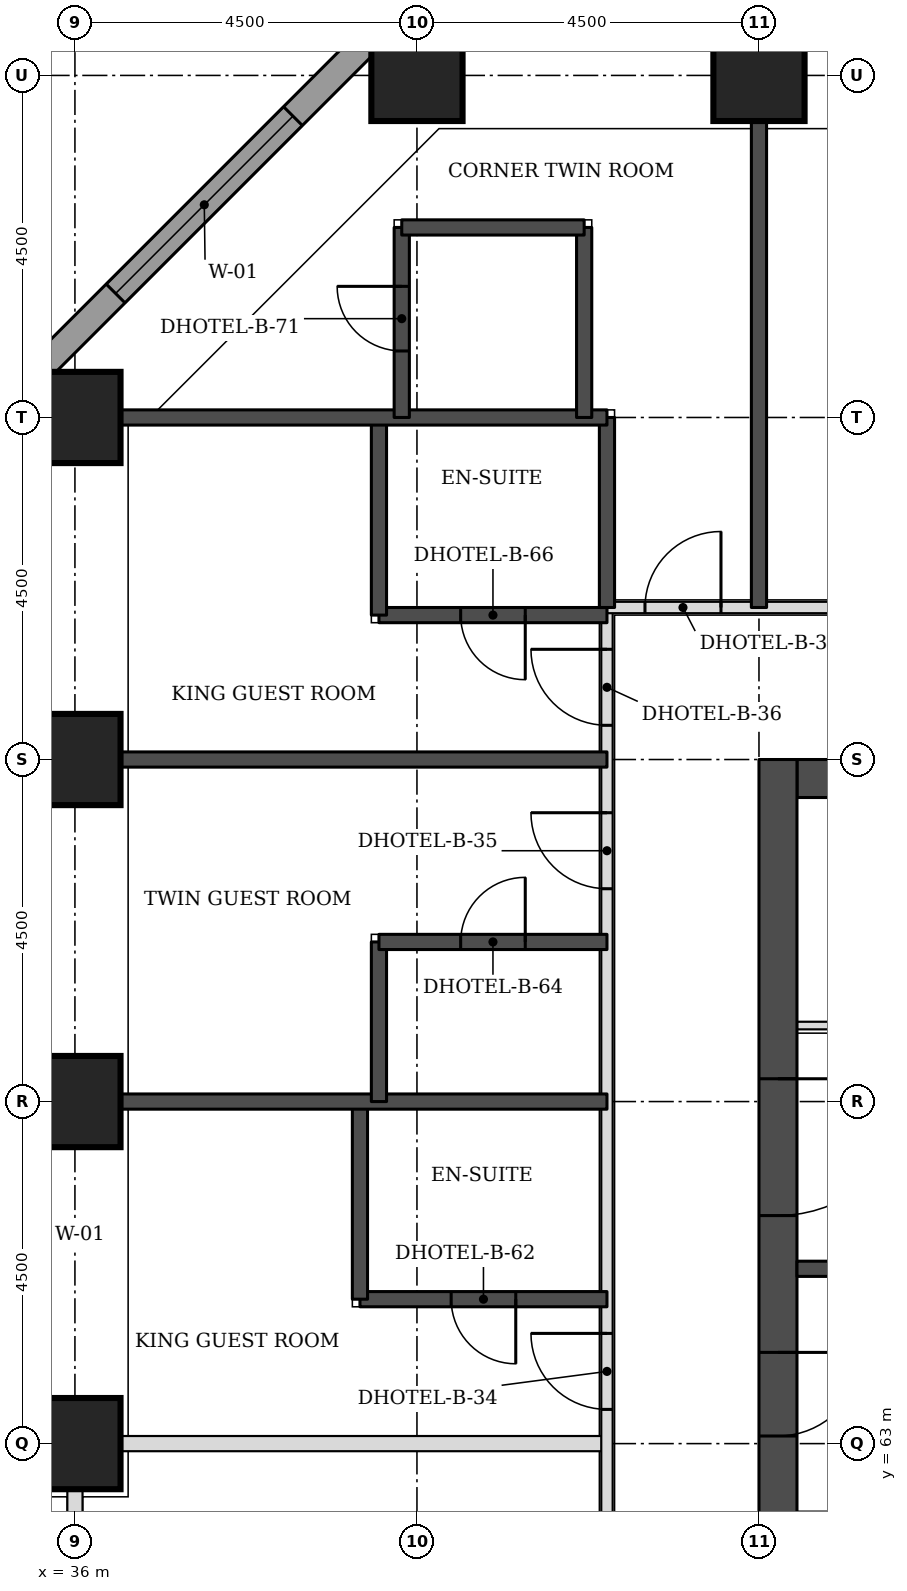
"""IFC4 building model, lengths in metres.
Left out: names, types, materials, properties, quantities, classifications, styles, units other than length and angle.
Written with IfcOpenShell. Run it as: python <this file> out.ifc"""

import sys

from ifc_helpers import new_model, si_unit, direction, frame, frame_2d, origin, origin_2d, place, context, subcontext, project, spatial, rectangle, extrude, element, fill, save


model = new_model("IFC4")
c1 = context("Model", 3, precision=1e-05, world=origin(), true_north=direction((0.0, 1.0)))
c2 = subcontext(c1, "Body", "Model", "MODEL_VIEW")
j1 = project(units=[si_unit("LENGTHUNIT", "METRE"), si_unit("PLANEANGLEUNIT", "RADIAN")], contexts=[c1])
p1 = place(None, origin())
s1 = spatial("IfcSite", under=j1, at=p1, CompositionType="ELEMENT")
p2 = place(p1, origin())
s2 = spatial("IfcBuilding", under=s1, at=p2, CompositionType="ELEMENT")
p3 = place(p2, frame((0.0, 0.0, 29.7)))
s3 = spatial("IfcBuildingStorey", under=s2, at=p3, CompositionType="ELEMENT", Elevation=29.7)
for number, where, z_axis, x_axis in (
    (1, (36.0, 63.0, 0.0), (0.0, 0.0, 1.0), (1.0, 0.0, 0.0)),
    (2, (36.0, 67.5, 0.0), (0.0, 0.0, 1.0), (1.0, 0.0, 0.0)),
    (3, (36.0, 72.0, 0.0), (0.0, 0.0, 1.0), (1.0, 0.0, 0.0)),
    (4, (36.0, 76.5, 0.0), (0.0, 0.0, 1.0), (1.0, 0.0, 0.0)),
    (5, (40.5, 81.0, 0.0), (0.0, 0.0, 1.0), (1.0, 0.0, 0.0)),
    (6, (45.0, 81.0, 0.0), (0.0, 0.0, 1.0), (1.0, 0.0, 0.0)),
):
    element("IfcColumn", number, at=place(p3, frame(where, z_axis=z_axis, x_axis=x_axis)), inside=s3, PredefinedType="COLUMN", context=c2, shape_type="SweptSolid", body=[
        extrude(rectangle(XDim=1.2, YDim=1.2, at=origin_2d()), origin(), (0.0, 0.0, 1.0), 3.3),
    ])
p4 = place(p3, frame((45.5, 71.75, 0.0), z_axis=(0.0, 0.0, 1.0), x_axis=(1.0, 0.0, 0.0)))
e7 = element("IfcWall", 7, at=p4, inside=s3, PredefinedType="SHEAR", context=c2, shape_type="SweptSolid", body=[
    extrude(rectangle(XDim=21.5, YDim=0.5, at=frame_2d((10.75, 0.0))), origin(), (0.0, 0.0, 1.0), 3.3),
])
p5 = place(p3, frame((45.25, 49.5, 0.0), z_axis=(0.0, 0.0, 1.0), x_axis=(0.0, 1.0, 0.0)))
e8 = element("IfcWall", 8, at=p5, inside=s3, PredefinedType="SHEAR", context=c2, shape_type="SweptSolid", body=[
    extrude(rectangle(XDim=22.5, YDim=0.5, at=frame_2d((11.25, 0.0))), origin(), (0.0, 0.0, 1.0), 3.3),
])
p6 = place(p5, frame((4.2, 0.0, 0.0)))
e9 = element("IfcOpeningElement", 9, at=p6, cuts=e8, PredefinedType="OPENING", context=c2, shape_type="SweptSolid", body=[
    extrude(rectangle(XDim=1.8, YDim=2.1, at=frame_2d((0.9, 1.05))), frame((0.0, 0.26, 0.0), z_axis=(0.0, -1.0, 0.0), x_axis=(1.0, 0.0, 0.0)), (0.0, 0.0, 1.0), 0.52),
])
p7 = place(p5, frame((6.9, 0.0, 0.0)))
e10 = element("IfcOpeningElement", 10, at=p7, cuts=e8, PredefinedType="OPENING", context=c2, shape_type="SweptSolid", body=[
    extrude(rectangle(XDim=1.1, YDim=2.1, at=frame_2d((0.55, 1.05))), frame((0.0, 0.26, 0.0), z_axis=(0.0, -1.0, 0.0), x_axis=(1.0, 0.0, 0.0)), (0.0, 0.0, 1.0), 0.52),
])
p8 = place(p5, frame((13.6, 0.0, 0.0)))
e11 = element("IfcOpeningElement", 11, at=p8, cuts=e8, PredefinedType="OPENING", context=c2, shape_type="SweptSolid", body=[
    extrude(rectangle(XDim=1.1, YDim=2.1, at=frame_2d((0.55, 1.05))), frame((0.0, 0.26, 0.0), z_axis=(0.0, -1.0, 0.0), x_axis=(1.0, 0.0, 0.0)), (0.0, 0.0, 1.0), 0.52),
])
p9 = place(p5, frame((16.5, 0.0, 0.0)))
e12 = element("IfcOpeningElement", 12, at=p9, cuts=e8, PredefinedType="OPENING", context=c2, shape_type="SweptSolid", body=[
    extrude(rectangle(XDim=1.8, YDim=2.1, at=frame_2d((0.9, 1.05))), frame((0.0, 0.26, 0.0), z_axis=(0.0, -1.0, 0.0), x_axis=(1.0, 0.0, 0.0)), (0.0, 0.0, 1.0), 0.52),
])
p10 = place(p3, frame((40.23, 81.826, 0.0), z_axis=(0.0, 0.0, 1.0), x_axis=(-0.707106781187, -0.707106781187, 0.0)))
e13 = element("IfcWall", 13, at=p10, inside=s3, PredefinedType="STANDARD", context=c2, shape_type="SweptSolid", body=[
    extrude(rectangle(XDim=7.151, YDim=0.35, at=frame_2d((3.576, 0.0))), origin(), (0.0, 0.0, 1.0), 3.055),
])
p11 = place(p10, frame((1.926, 0.0, 0.8)))
e14 = element("IfcOpeningElement", 14, at=p11, cuts=e13, PredefinedType="OPENING", context=c2, shape_type="SweptSolid", body=[
    extrude(rectangle(XDim=3.3, YDim=1.5, at=frame_2d((1.65, 0.75))), frame((0.0, 0.185, 0.0), z_axis=(0.0, -1.0, 0.0), x_axis=(1.0, 0.0, 0.0)), (0.0, 0.0, 1.0), 0.37),
])
p12 = place(p3, frame((36.0, 56.0, 0.0), z_axis=(0.0, 0.0, 1.0), x_axis=(0.0, 1.0, 0.0)))
e15 = element("IfcWall", 15, at=p12, inside=s3, PredefinedType="PARTITIONING", context=c2, shape_type="SweptSolid", body=[
    extrude(rectangle(XDim=6.4, YDim=0.2, at=frame_2d((3.2, 0.0))), origin(), (0.0, 0.0, 1.0), 2.33),
])
p13 = place(p3, frame((36.6, 63.0, 0.0), z_axis=(0.0, 0.0, 1.0), x_axis=(1.0, 0.0, 0.0)))
e16 = element("IfcWall", 16, at=p13, inside=s3, PredefinedType="PARTITIONING", context=c2, shape_type="SweptSolid", body=[
    extrude(rectangle(XDim=6.4, YDim=0.2, at=frame_2d((3.2, 0.0))), origin(), (0.0, 0.0, 1.0), 3.08),
])
p14 = place(p3, frame((43.0, 56.0, 0.0), z_axis=(0.0, 0.0, 1.0), x_axis=(0.0, 1.0, 0.0)))
e17 = element("IfcWall", 17, at=p14, inside=s3, PredefinedType="PARTITIONING", context=c2, shape_type="SweptSolid", body=[
    extrude(rectangle(XDim=18.0, YDim=0.15, at=frame_2d((9.0, 0.0))), origin(), (0.0, 0.0, 1.0), 3.08),
])
p15 = place(p14, frame((7.45, 0.0, 0.0)))
e18 = element("IfcOpeningElement", 18, at=p15, cuts=e17, PredefinedType="OPENING", context=c2, shape_type="SweptSolid", body=[
    extrude(rectangle(XDim=1.0, YDim=2.1, at=frame_2d((0.5, 1.05))), frame((0.0, 0.085, 0.0), z_axis=(0.0, -1.0, 0.0), x_axis=(1.0, 0.0, 0.0)), (0.0, 0.0, 1.0), 0.17),
])
p16 = place(p14, frame((14.3, 0.0, 0.0)))
e19 = element("IfcOpeningElement", 19, at=p16, cuts=e17, PredefinedType="OPENING", context=c2, shape_type="SweptSolid", body=[
    extrude(rectangle(XDim=1.0, YDim=2.1, at=frame_2d((0.5, 1.05))), frame((0.0, 0.085, 0.0), z_axis=(0.0, -1.0, 0.0), x_axis=(1.0, 0.0, 0.0)), (0.0, 0.0, 1.0), 0.17),
])
p17 = place(p14, frame((16.45, 0.0, 0.0)))
e20 = element("IfcOpeningElement", 20, at=p17, cuts=e17, PredefinedType="OPENING", context=c2, shape_type="SweptSolid", body=[
    extrude(rectangle(XDim=1.0, YDim=2.1, at=frame_2d((0.5, 1.05))), frame((0.0, 0.085, 0.0), z_axis=(0.0, -1.0, 0.0), x_axis=(1.0, 0.0, 0.0)), (0.0, 0.0, 1.0), 0.17),
])
p18 = place(p14, frame((3.05, 0.0, 0.0)))
e21 = element("IfcOpeningElement", 21, at=p18, cuts=e17, PredefinedType="OPENING", context=c2, shape_type="SweptSolid", body=[
    extrude(rectangle(XDim=0.9, YDim=2.1, at=frame_2d((0.45, 1.05))), frame((0.0, 0.085, 0.0), z_axis=(0.0, -1.0, 0.0), x_axis=(1.0, 0.0, 0.0)), (0.0, 0.0, 1.0), 0.17),
])
p19 = place(p3, frame((43.0, 74.0, 0.0), z_axis=(0.0, 0.0, 1.0), x_axis=(1.0, 0.0, 0.0)))
e22 = element("IfcWall", 22, at=p19, inside=s3, PredefinedType="PARTITIONING", context=c2, shape_type="SweptSolid", body=[
    extrude(rectangle(XDim=26.5, YDim=0.15, at=frame_2d((13.25, 0.0))), origin(), (0.0, 0.0, 1.0), 3.08),
])
p20 = place(p19, frame((4.65, 0.0, 0.0)))
e23 = element("IfcOpeningElement", 23, at=p20, cuts=e22, PredefinedType="OPENING", context=c2, shape_type="SweptSolid", body=[
    extrude(rectangle(XDim=1.0, YDim=2.1, at=frame_2d((0.5, 1.05))), frame((0.0, 0.085, 0.0), z_axis=(0.0, -1.0, 0.0), x_axis=(1.0, 0.0, 0.0)), (0.0, 0.0, 1.0), 0.17),
])
p21 = place(p19, frame((16.6, 0.0, 0.0)))
e24 = element("IfcOpeningElement", 24, at=p21, cuts=e22, PredefinedType="OPENING", context=c2, shape_type="SweptSolid", body=[
    extrude(rectangle(XDim=1.0, YDim=2.1, at=frame_2d((0.5, 1.05))), frame((0.0, 0.085, 0.0), z_axis=(0.0, -1.0, 0.0), x_axis=(1.0, 0.0, 0.0)), (0.0, 0.0, 1.0), 0.17),
])
p22 = place(p19, frame((20.7, 0.0, 0.0)))
e25 = element("IfcOpeningElement", 25, at=p22, cuts=e22, PredefinedType="OPENING", context=c2, shape_type="SweptSolid", body=[
    extrude(rectangle(XDim=1.0, YDim=2.1, at=frame_2d((0.5, 1.05))), frame((0.0, 0.085, 0.0), z_axis=(0.0, -1.0, 0.0), x_axis=(1.0, 0.0, 0.0)), (0.0, 0.0, 1.0), 0.17),
])
p23 = place(p19, frame((0.5, 0.0, 0.0)))
e26 = element("IfcOpeningElement", 26, at=p23, cuts=e22, PredefinedType="OPENING", context=c2, shape_type="SweptSolid", body=[
    extrude(rectangle(XDim=1.0, YDim=2.1, at=frame_2d((0.5, 1.05))), frame((0.0, 0.085, 0.0), z_axis=(0.0, -1.0, 0.0), x_axis=(1.0, 0.0, 0.0)), (0.0, 0.0, 1.0), 0.17),
])
p24 = place(p19, frame((25.0, 0.0, 0.0)))
e27 = element("IfcOpeningElement", 27, at=p24, cuts=e22, PredefinedType="OPENING", context=c2, shape_type="SweptSolid", body=[
    extrude(rectangle(XDim=1.0, YDim=2.1, at=frame_2d((0.5, 1.05))), frame((0.0, 0.085, 0.0), z_axis=(0.0, -1.0, 0.0), x_axis=(1.0, 0.0, 0.0)), (0.0, 0.0, 1.0), 0.17),
])
p25 = place(p3, frame((39.75, 64.9, 0.0), z_axis=(0.0, 0.0, 1.0), x_axis=(1.0, 0.0, 0.0)))
e28 = element("IfcWall", 28, at=p25, inside=s3, PredefinedType="SOLIDWALL", context=c2, shape_type="SweptSolid", body=[
    extrude(rectangle(XDim=3.25, YDim=0.2, at=frame_2d((1.625, 0.0))), origin(), (0.0, 0.0, 1.0), 3.08),
])
p26 = place(p25, frame((1.2, 0.0, 0.0)))
e29 = element("IfcOpeningElement", 29, at=p26, cuts=e28, PredefinedType="OPENING", context=c2, shape_type="SweptSolid", body=[
    extrude(rectangle(XDim=0.85, YDim=2.1, at=frame_2d((0.425, 1.05))), frame((0.0, 0.11, 0.0), z_axis=(0.0, -1.0, 0.0), x_axis=(1.0, 0.0, 0.0)), (0.0, 0.0, 1.0), 0.22),
])
p27 = place(p3, frame((39.75, 64.9, 0.0), z_axis=(0.0, 0.0, 1.0), x_axis=(0.0, 1.0, 0.0)))
e30 = element("IfcWall", 30, at=p27, inside=s3, PredefinedType="SOLIDWALL", context=c2, shape_type="SweptSolid", body=[
    extrude(rectangle(XDim=2.6, YDim=0.2, at=frame_2d((1.3, 0.0))), origin(), (0.0, 0.0, 1.0), 3.08),
])
p28 = place(p3, frame((36.6, 67.5, 0.0), z_axis=(0.0, 0.0, 1.0), x_axis=(1.0, 0.0, 0.0)))
e31 = element("IfcWall", 31, at=p28, inside=s3, PredefinedType="SOLIDWALL", context=c2, shape_type="SweptSolid", body=[
    extrude(rectangle(XDim=6.4, YDim=0.2, at=frame_2d((3.2, 0.0))), origin(), (0.0, 0.0, 1.0), 3.08),
])
p29 = place(p3, frame((40.0, 67.5, 0.0), z_axis=(0.0, 0.0, 1.0), x_axis=(0.0, 1.0, 0.0)))
e32 = element("IfcWall", 32, at=p29, inside=s3, PredefinedType="SOLIDWALL", context=c2, shape_type="SweptSolid", body=[
    extrude(rectangle(XDim=2.1, YDim=0.2, at=frame_2d((1.05, 0.0))), origin(), (0.0, 0.0, 1.0), 3.08),
])
p30 = place(p3, frame((40.0, 69.6, 0.0), z_axis=(0.0, 0.0, 1.0), x_axis=(1.0, 0.0, 0.0)))
e33 = element("IfcWall", 33, at=p30, inside=s3, PredefinedType="SOLIDWALL", context=c2, shape_type="SweptSolid", body=[
    extrude(rectangle(XDim=3.0, YDim=0.2, at=frame_2d((1.5, 0.0))), origin(), (0.0, 0.0, 1.0), 3.08),
])
p31 = place(p30, frame((1.075, 0.0, 0.0)))
e34 = element("IfcOpeningElement", 34, at=p31, cuts=e33, PredefinedType="OPENING", context=c2, shape_type="SweptSolid", body=[
    extrude(rectangle(XDim=0.85, YDim=2.1, at=frame_2d((0.425, 1.05))), frame((0.0, 0.11, 0.0), z_axis=(0.0, -1.0, 0.0), x_axis=(1.0, 0.0, 0.0)), (0.0, 0.0, 1.0), 0.22),
])
p32 = place(p3, frame((36.6, 72.0, 0.0), z_axis=(0.0, 0.0, 1.0), x_axis=(1.0, 0.0, 0.0)))
e35 = element("IfcWall", 35, at=p32, inside=s3, PredefinedType="SOLIDWALL", context=c2, shape_type="SweptSolid", body=[
    extrude(rectangle(XDim=6.4, YDim=0.2, at=frame_2d((3.2, 0.0))), origin(), (0.0, 0.0, 1.0), 3.08),
])
p33 = place(p3, frame((40.0, 73.9, 0.0), z_axis=(0.0, 0.0, 1.0), x_axis=(1.0, 0.0, 0.0)))
e36 = element("IfcWall", 36, at=p33, inside=s3, PredefinedType="SOLIDWALL", context=c2, shape_type="SweptSolid", body=[
    extrude(rectangle(XDim=3.0, YDim=0.2, at=frame_2d((1.5, 0.0))), origin(), (0.0, 0.0, 1.0), 3.08),
])
p34 = place(p33, frame((1.075, 0.0, 0.0)))
e37 = element("IfcOpeningElement", 37, at=p34, cuts=e36, PredefinedType="OPENING", context=c2, shape_type="SweptSolid", body=[
    extrude(rectangle(XDim=0.85, YDim=2.1, at=frame_2d((0.425, 1.05))), frame((0.0, 0.11, 0.0), z_axis=(0.0, -1.0, 0.0), x_axis=(1.0, 0.0, 0.0)), (0.0, 0.0, 1.0), 0.22),
])
p35 = place(p3, frame((40.0, 73.9, 0.0), z_axis=(0.0, 0.0, 1.0), x_axis=(0.0, 1.0, 0.0)))
e38 = element("IfcWall", 38, at=p35, inside=s3, PredefinedType="SOLIDWALL", context=c2, shape_type="SweptSolid", body=[
    extrude(rectangle(XDim=2.6, YDim=0.2, at=frame_2d((1.3, 0.0))), origin(), (0.0, 0.0, 1.0), 3.08),
])
p36 = place(p3, frame((43.0, 74.0, 0.0), z_axis=(0.0, 0.0, 1.0), x_axis=(0.0, 1.0, 0.0)))
e39 = element("IfcWall", 39, at=p36, inside=s3, PredefinedType="SOLIDWALL", context=c2, shape_type="SweptSolid", body=[
    extrude(rectangle(XDim=2.5, YDim=0.2, at=frame_2d((1.25, 0.0))), origin(), (0.0, 0.0, 1.0), 3.08),
])
for number, where, z_axis, x_axis in (
    (40, (45.0, 74.0, 0.0), (0.0, 0.0, 1.0), (0.0, 1.0, 0.0)),
    (41, (36.6, 76.5, 0.0), (0.0, 0.0, 1.0), (1.0, 0.0, 0.0)),
):
    element("IfcWall", number, at=place(p3, frame(where, z_axis=z_axis, x_axis=x_axis)), inside=s3, PredefinedType="SOLIDWALL", context=c2, shape_type="SweptSolid", body=[
        extrude(rectangle(XDim=6.4, YDim=0.2, at=frame_2d((3.2, 0.0))), origin(), (0.0, 0.0, 1.0), 3.08),
    ])
p37 = place(p3, frame((40.3, 76.5, 0.0), z_axis=(0.0, 0.0, 1.0), x_axis=(0.0, 1.0, 0.0)))
e42 = element("IfcWall", 42, at=p37, inside=s3, PredefinedType="SOLIDWALL", context=c2, shape_type="SweptSolid", body=[
    extrude(rectangle(XDim=2.5, YDim=0.2, at=frame_2d((1.25, 0.0))), origin(), (0.0, 0.0, 1.0), 3.08),
])
p38 = place(p37, frame((0.875, 0.0, 0.0)))
e43 = element("IfcOpeningElement", 43, at=p38, cuts=e42, PredefinedType="OPENING", context=c2, shape_type="SweptSolid", body=[
    extrude(rectangle(XDim=0.85, YDim=2.1, at=frame_2d((0.425, 1.05))), frame((0.0, 0.11, 0.0), z_axis=(0.0, -1.0, 0.0), x_axis=(1.0, 0.0, 0.0)), (0.0, 0.0, 1.0), 0.22),
])
p39 = place(p3, frame((42.7, 76.5, 0.0), z_axis=(0.0, 0.0, 1.0), x_axis=(0.0, 1.0, 0.0)))
e44 = element("IfcWall", 44, at=p39, inside=s3, PredefinedType="SOLIDWALL", context=c2, shape_type="SweptSolid", body=[
    extrude(rectangle(XDim=2.5, YDim=0.2, at=frame_2d((1.25, 0.0))), origin(), (0.0, 0.0, 1.0), 3.08),
])
p40 = place(p3, frame((40.3, 79.0, 0.0), z_axis=(0.0, 0.0, 1.0), x_axis=(1.0, 0.0, 0.0)))
e45 = element("IfcWall", 45, at=p40, inside=s3, PredefinedType="SOLIDWALL", context=c2, shape_type="SweptSolid", body=[
    extrude(rectangle(XDim=2.4, YDim=0.2, at=frame_2d((1.2, 0.0))), origin(), (0.0, 0.0, 1.0), 3.08),
])
p41 = place(p3, frame((45.5, 65.3, 0.0), z_axis=(0.0, 0.0, 1.0), x_axis=(1.0, 0.0, 0.0)))
e46 = element("IfcWall", 46, at=p41, inside=s3, PredefinedType="SOLIDWALL", context=c2, shape_type="SweptSolid", body=[
    extrude(rectangle(XDim=2.3, YDim=0.2, at=frame_2d((1.15, 0.0))), origin(), (0.0, 0.0, 1.0), 3.08),
])
p42 = place(p3, frame((45.5, 68.5, 0.0), z_axis=(0.0, 0.0, 1.0), x_axis=(1.0, 0.0, 0.0)))
e47 = element("IfcWall", 47, at=p42, inside=s3, PredefinedType="PARTITIONING", context=c2, shape_type="SweptSolid", body=[
    extrude(rectangle(XDim=5.15, YDim=0.1, at=frame_2d((2.575, 0.0))), origin(), (0.0, 0.0, 1.0), 3.08),
])
p43 = place(p42, frame((2.125, 0.0, 0.0)))
e48 = element("IfcOpeningElement", 48, at=p43, cuts=e47, PredefinedType="OPENING", context=c2, shape_type="SweptSolid", body=[
    extrude(rectangle(XDim=0.9, YDim=2.1, at=frame_2d((0.45, 1.05))), frame((0.0, 0.06, 0.0), z_axis=(0.0, -1.0, 0.0), x_axis=(1.0, 0.0, 0.0)), (0.0, 0.0, 1.0), 0.12),
])
p44 = place(p11, origin())
e49 = element("IfcWindow", 49, at=p44, inside=s3, PartitioningType="SINGLE_PANEL", PredefinedType="WINDOW", context=c2, shape_type="SweptSolid", body=[
    extrude(rectangle(XDim=3.3, YDim=1.5, at=frame_2d((1.65, 0.75))), frame((0.0, 0.085, 0.0), z_axis=(0.0, -1.0, 0.0), x_axis=(1.0, 0.0, 0.0)), (0.0, 0.0, 1.0), 0.06),
])
fill(e14, e49)
p45 = place(p15, origin())
e50 = element("IfcDoor", 50, at=p45, inside=s3, OperationType="SINGLE_SWING_RIGHT", PredefinedType="DOOR", context=c2, shape_type="SweptSolid", body=[
    extrude(rectangle(XDim=1.0, YDim=2.1, at=frame_2d((0.5, 1.05))), frame((0.0, 0.025, 0.0), z_axis=(0.0, -1.0, 0.0), x_axis=(1.0, 0.0, 0.0)), (0.0, 0.0, 1.0), 0.05),
])
fill(e18, e50)
p46 = place(p26, frame((0.85, 0.0, 0.0), z_axis=(0.0, 0.0, 1.0), x_axis=(-1.0, 0.0, 0.0)))
e51 = element("IfcDoor", 51, at=p46, inside=s3, OperationType="SINGLE_SWING_LEFT", PredefinedType="DOOR", context=c2, shape_type="SweptSolid", body=[
    extrude(rectangle(XDim=0.85, YDim=2.1, at=frame_2d((0.425, 1.05))), frame((0.0, 0.025, 0.0), z_axis=(0.0, -1.0, 0.0), x_axis=(1.0, 0.0, 0.0)), (0.0, 0.0, 1.0), 0.05),
])
fill(e29, e51)
p47 = place(p16, origin())
e52 = element("IfcDoor", 52, at=p47, inside=s3, OperationType="SINGLE_SWING_RIGHT", PredefinedType="DOOR", context=c2, shape_type="SweptSolid", body=[
    extrude(rectangle(XDim=1.0, YDim=2.1, at=frame_2d((0.5, 1.05))), frame((0.0, 0.025, 0.0), z_axis=(0.0, -1.0, 0.0), x_axis=(1.0, 0.0, 0.0)), (0.0, 0.0, 1.0), 0.05),
])
fill(e19, e52)
p48 = place(p31, origin())
e53 = element("IfcDoor", 53, at=p48, inside=s3, OperationType="SINGLE_SWING_RIGHT", PredefinedType="DOOR", context=c2, shape_type="SweptSolid", body=[
    extrude(rectangle(XDim=0.85, YDim=2.1, at=frame_2d((0.425, 1.05))), frame((0.0, 0.025, 0.0), z_axis=(0.0, -1.0, 0.0), x_axis=(1.0, 0.0, 0.0)), (0.0, 0.0, 1.0), 0.05),
])
fill(e34, e53)
p49 = place(p17, origin())
e54 = element("IfcDoor", 54, at=p49, inside=s3, OperationType="SINGLE_SWING_RIGHT", PredefinedType="DOOR", context=c2, shape_type="SweptSolid", body=[
    extrude(rectangle(XDim=1.0, YDim=2.1, at=frame_2d((0.5, 1.05))), frame((0.0, 0.025, 0.0), z_axis=(0.0, -1.0, 0.0), x_axis=(1.0, 0.0, 0.0)), (0.0, 0.0, 1.0), 0.05),
])
fill(e20, e54)
p50 = place(p34, frame((0.85, 0.0, 0.0), z_axis=(0.0, 0.0, 1.0), x_axis=(-1.0, 0.0, 0.0)))
e55 = element("IfcDoor", 55, at=p50, inside=s3, OperationType="SINGLE_SWING_LEFT", PredefinedType="DOOR", context=c2, shape_type="SweptSolid", body=[
    extrude(rectangle(XDim=0.85, YDim=2.1, at=frame_2d((0.425, 1.05))), frame((0.0, 0.025, 0.0), z_axis=(0.0, -1.0, 0.0), x_axis=(1.0, 0.0, 0.0)), (0.0, 0.0, 1.0), 0.05),
])
fill(e37, e55)
p51 = place(p23, origin())
e56 = element("IfcDoor", 56, at=p51, inside=s3, OperationType="SINGLE_SWING_RIGHT", PredefinedType="DOOR", context=c2, shape_type="SweptSolid", body=[
    extrude(rectangle(XDim=1.0, YDim=2.1, at=frame_2d((0.5, 1.05))), frame((0.0, 0.025, 0.0), z_axis=(0.0, -1.0, 0.0), x_axis=(1.0, 0.0, 0.0)), (0.0, 0.0, 1.0), 0.05),
])
fill(e26, e56)
p52 = place(p38, origin())
e57 = element("IfcDoor", 57, at=p52, inside=s3, OperationType="SINGLE_SWING_RIGHT", PredefinedType="DOOR", context=c2, shape_type="SweptSolid", body=[
    extrude(rectangle(XDim=0.85, YDim=2.1, at=frame_2d((0.425, 1.05))), frame((0.0, 0.025, 0.0), z_axis=(0.0, -1.0, 0.0), x_axis=(1.0, 0.0, 0.0)), (0.0, 0.0, 1.0), 0.05),
])
fill(e43, e57)
p53 = place(p8, frame((1.1, 0.0, 0.0), z_axis=(0.0, 0.0, 1.0), x_axis=(-1.0, 0.0, 0.0)))
e58 = element("IfcDoor", 58, at=p53, inside=s3, OperationType="SINGLE_SWING_LEFT", PredefinedType="DOOR", context=c2, shape_type="SweptSolid", body=[
    extrude(rectangle(XDim=1.1, YDim=2.1, at=frame_2d((0.55, 1.05))), frame((0.0, 0.025, 0.0), z_axis=(0.0, -1.0, 0.0), x_axis=(1.0, 0.0, 0.0)), (0.0, 0.0, 1.0), 0.05),
])
fill(e11, e58)
p54 = place(p9, frame((1.8, 0.0, 0.0), z_axis=(0.0, 0.0, 1.0), x_axis=(-1.0, 0.0, 0.0)))
e59 = element("IfcDoor", 59, at=p54, inside=s3, OperationType="SINGLE_SWING_LEFT", PredefinedType="DOOR", context=c2, shape_type="SweptSolid", body=[
    extrude(rectangle(XDim=1.8, YDim=2.1, at=frame_2d((0.9, 1.05))), frame((0.0, 0.025, 0.0), z_axis=(0.0, -1.0, 0.0), x_axis=(1.0, 0.0, 0.0)), (0.0, 0.0, 1.0), 0.05),
])
fill(e12, e59)
save(model, sys.argv[1])
